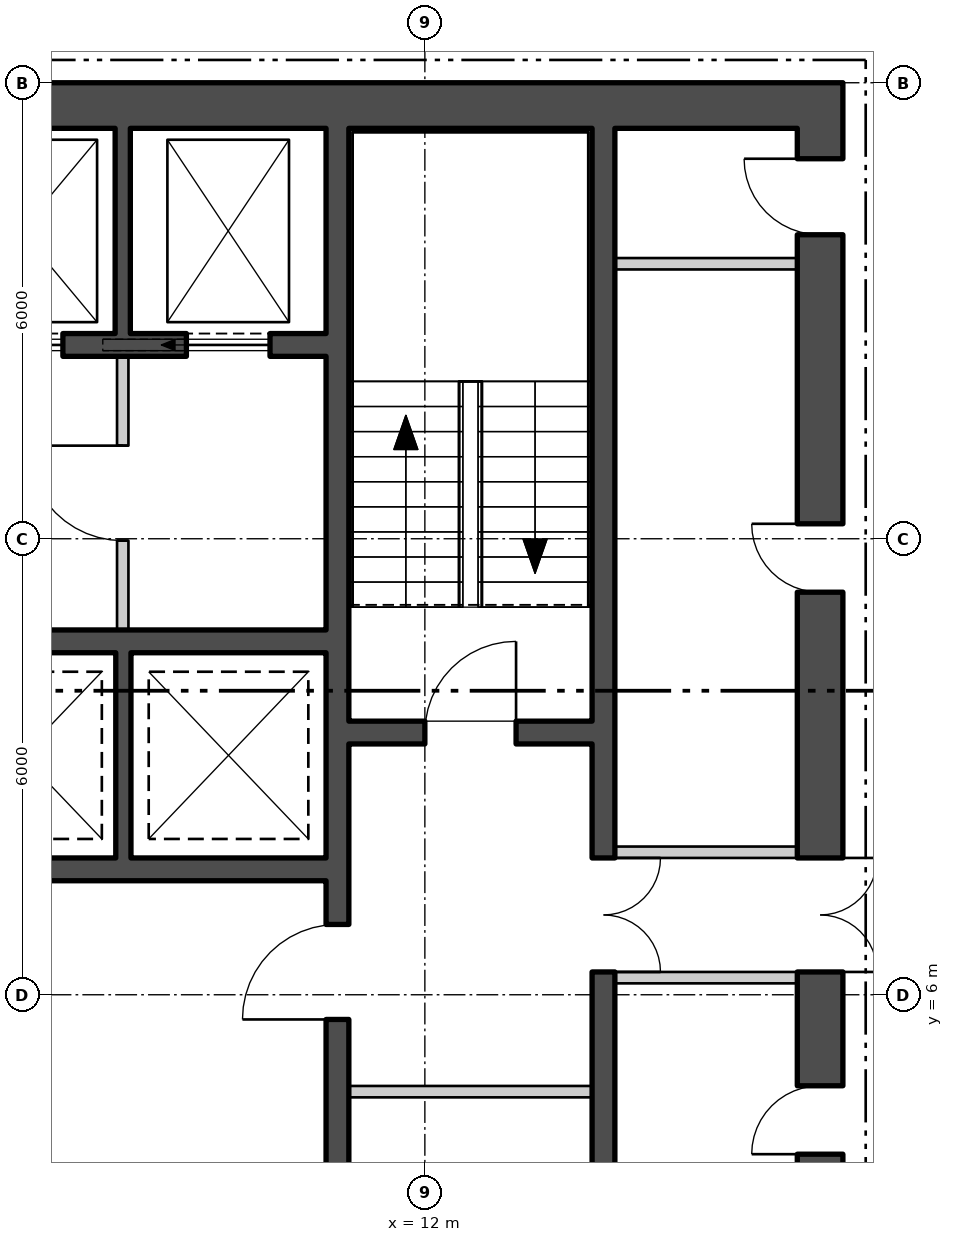
"""IFC4 building model, lengths in metres.
Left out: names, types, materials, properties, quantities, classifications, styles, units other than length and angle.
Written with IfcOpenShell. Run it as: python <this file> out.ifc"""

import sys

from ifc_helpers import new_model, si_unit, direction, frame, frame_2d, origin, place, context, subcontext, project, spatial, polyline, rectangle, outline, extrude, element, fill, save


model = new_model("IFC4")
c1 = context("Model", 3, precision=1e-05, world=origin(), true_north=direction((0.0, 1.0)))
c2 = subcontext(c1, "Body", "Model", "MODEL_VIEW")
j1 = project(units=[si_unit("LENGTHUNIT", "METRE"), si_unit("PLANEANGLEUNIT", "RADIAN")], contexts=[c1])
p1 = place(None, origin())
s1 = spatial("IfcSite", under=j1, at=p1, CompositionType="ELEMENT")
p2 = place(p1, origin())
s2 = spatial("IfcBuilding", under=s1, at=p2, CompositionType="ELEMENT")
p3 = place(p2, frame((0.0, 0.0, 78.3)))
s3 = spatial("IfcBuildingStorey", under=s2, at=p3, CompositionType="ELEMENT", Elevation=78.3)
p4 = place(p3, frame((5.22, -28.679, -0.18), z_axis=(0.0, 0.0, 1.0), x_axis=(0.500000711659, 0.866024992908, 0.0)))
e1 = element("IfcWall", 1, at=p4, inside=s3, PredefinedType="SOLIDWALL", context=c2, shape_type="SweptSolid", body=[
    extrude(outline(polyline([(-0.13, -0.225), (45.87, -0.225), (45.61, 0.225), (0.13, 0.225), (-0.13, -0.225)])), origin(), (0.0, 0.0, 1.0), 6.0),
])
p5 = place(p4, frame((1.424, 0.0, 1.38)))
e2 = element("IfcOpeningElement", 2, at=p5, cuts=e1, PredefinedType="OPENING", context=c2, shape_type="SweptSolid", body=[
    extrude(rectangle(XDim=2.4, YDim=3.6, at=frame_2d((1.2, 1.8))), frame((0.0, 0.235, 0.0), z_axis=(0.0, -1.0, 0.0), x_axis=(1.0, 0.0, 0.0)), (0.0, 0.0, 1.0), 0.47),
])
p6 = place(p4, frame((5.893, 0.0, 1.38)))
e3 = element("IfcOpeningElement", 3, at=p6, cuts=e1, PredefinedType="OPENING", context=c2, shape_type="SweptSolid", body=[
    extrude(rectangle(XDim=2.4, YDim=3.6, at=frame_2d((1.2, 1.8))), frame((0.0, 0.235, 0.0), z_axis=(0.0, -1.0, 0.0), x_axis=(1.0, 0.0, 0.0)), (0.0, 0.0, 1.0), 0.47),
])
p7 = place(p4, frame((10.401, 0.0, 1.38)))
e4 = element("IfcOpeningElement", 4, at=p7, cuts=e1, PredefinedType="OPENING", context=c2, shape_type="SweptSolid", body=[
    extrude(rectangle(XDim=2.4, YDim=3.6, at=frame_2d((1.2, 1.8))), frame((0.0, 0.235, 0.0), z_axis=(0.0, -1.0, 0.0), x_axis=(1.0, 0.0, 0.0)), (0.0, 0.0, 1.0), 0.47),
])
p8 = place(p4, frame((14.909, 0.0, 1.38)))
e5 = element("IfcOpeningElement", 5, at=p8, cuts=e1, PredefinedType="OPENING", context=c2, shape_type="SweptSolid", body=[
    extrude(rectangle(XDim=2.4, YDim=3.6, at=frame_2d((1.2, 1.8))), frame((0.0, 0.235, 0.0), z_axis=(0.0, -1.0, 0.0), x_axis=(1.0, 0.0, 0.0)), (0.0, 0.0, 1.0), 0.47),
])
p9 = place(p4, frame((19.416, 0.0, 1.38)))
e6 = element("IfcOpeningElement", 6, at=p9, cuts=e1, PredefinedType="OPENING", context=c2, shape_type="SweptSolid", body=[
    extrude(rectangle(XDim=2.4, YDim=3.6, at=frame_2d((1.2, 1.8))), frame((0.0, 0.235, 0.0), z_axis=(0.0, -1.0, 0.0), x_axis=(1.0, 0.0, 0.0)), (0.0, 0.0, 1.0), 0.47),
])
p10 = place(p4, frame((23.924, 0.0, 1.38)))
e7 = element("IfcOpeningElement", 7, at=p10, cuts=e1, PredefinedType="OPENING", context=c2, shape_type="SweptSolid", body=[
    extrude(rectangle(XDim=2.4, YDim=3.6, at=frame_2d((1.2, 1.8))), frame((0.0, 0.235, 0.0), z_axis=(0.0, -1.0, 0.0), x_axis=(1.0, 0.0, 0.0)), (0.0, 0.0, 1.0), 0.47),
])
p11 = place(p4, frame((28.431, 0.0, 1.38)))
e8 = element("IfcOpeningElement", 8, at=p11, cuts=e1, PredefinedType="OPENING", context=c2, shape_type="SweptSolid", body=[
    extrude(rectangle(XDim=2.4, YDim=3.6, at=frame_2d((1.2, 1.8))), frame((0.0, 0.235, 0.0), z_axis=(0.0, -1.0, 0.0), x_axis=(1.0, 0.0, 0.0)), (0.0, 0.0, 1.0), 0.47),
])
p12 = place(p4, frame((32.939, 0.0, 1.38)))
e9 = element("IfcOpeningElement", 9, at=p12, cuts=e1, PredefinedType="OPENING", context=c2, shape_type="SweptSolid", body=[
    extrude(rectangle(XDim=2.4, YDim=3.6, at=frame_2d((1.2, 1.8))), frame((0.0, 0.235, 0.0), z_axis=(0.0, -1.0, 0.0), x_axis=(1.0, 0.0, 0.0)), (0.0, 0.0, 1.0), 0.47),
])
p13 = place(p4, frame((37.447, 0.0, 1.38)))
e10 = element("IfcOpeningElement", 10, at=p13, cuts=e1, PredefinedType="OPENING", context=c2, shape_type="SweptSolid", body=[
    extrude(rectangle(XDim=2.4, YDim=3.6, at=frame_2d((1.2, 1.8))), frame((0.0, 0.235, 0.0), z_axis=(0.0, -1.0, 0.0), x_axis=(1.0, 0.0, 0.0)), (0.0, 0.0, 1.0), 0.47),
])
p14 = place(p4, frame((41.916, 0.0, 1.38)))
e11 = element("IfcOpeningElement", 11, at=p14, cuts=e1, PredefinedType="OPENING", context=c2, shape_type="SweptSolid", body=[
    extrude(rectangle(XDim=2.4, YDim=3.6, at=frame_2d((1.2, 1.8))), frame((0.0, 0.235, 0.0), z_axis=(0.0, -1.0, 0.0), x_axis=(1.0, 0.0, 0.0)), (0.0, 0.0, 1.0), 0.47),
])
p15 = place(p3, frame((-17.5, 17.7, 0.0), z_axis=(0.0, 0.0, 1.0), x_axis=(1.0, 0.0, 0.0)))
e12 = element("IfcWall", 12, at=p15, inside=s3, PredefinedType="SHEAR", context=c2, shape_type="SweptSolid", body=[
    extrude(rectangle(XDim=35.0, YDim=0.6, at=frame_2d((17.5, 0.0))), origin(), (0.0, 0.0, 1.0), 5.8),
])
p16 = place(p3, frame((17.2, 0.6, 0.0), z_axis=(0.0, 0.0, 1.0), x_axis=(0.0, 1.0, 0.0)))
e13 = element("IfcWall", 13, at=p16, inside=s3, PredefinedType="SHEAR", context=c2, shape_type="SweptSolid", body=[
    extrude(rectangle(XDim=16.8, YDim=0.6, at=frame_2d((8.4, 0.0))), origin(), (0.0, 0.0, 1.0), 5.8),
])
p17 = place(p16, frame((5.7, 0.0, 0.0)))
e14 = element("IfcOpeningElement", 14, at=p17, cuts=e13, PredefinedType="OPENING", context=c2, shape_type="SweptSolid", body=[
    extrude(rectangle(XDim=1.5, YDim=2.1, at=frame_2d((0.75, 1.05))), frame((0.0, 0.31, 0.0), z_axis=(0.0, -1.0, 0.0), x_axis=(1.0, 0.0, 0.0)), (0.0, 0.0, 1.0), 0.62),
])
p18 = place(p16, frame((0.452, 0.0, 0.0)))
e15 = element("IfcOpeningElement", 15, at=p18, cuts=e13, PredefinedType="OPENING", context=c2, shape_type="SweptSolid", body=[
    extrude(rectangle(XDim=0.9, YDim=2.1, at=frame_2d((0.45, 1.05))), frame((0.0, 0.31, 0.0), z_axis=(0.0, -1.0, 0.0), x_axis=(1.0, 0.0, 0.0)), (0.0, 0.0, 1.0), 0.62),
])
p19 = place(p16, frame((3.302, 0.0, 0.0)))
e16 = element("IfcOpeningElement", 16, at=p19, cuts=e13, PredefinedType="OPENING", context=c2, shape_type="SweptSolid", body=[
    extrude(rectangle(XDim=0.9, YDim=2.1, at=frame_2d((0.45, 1.05))), frame((0.0, 0.31, 0.0), z_axis=(0.0, -1.0, 0.0), x_axis=(1.0, 0.0, 0.0)), (0.0, 0.0, 1.0), 0.62),
])
p20 = place(p16, frame((10.697, 0.0, 0.0)))
e17 = element("IfcOpeningElement", 17, at=p20, cuts=e13, PredefinedType="OPENING", context=c2, shape_type="SweptSolid", body=[
    extrude(rectangle(XDim=0.9, YDim=2.1, at=frame_2d((0.45, 1.05))), frame((0.0, 0.31, 0.0), z_axis=(0.0, -1.0, 0.0), x_axis=(1.0, 0.0, 0.0)), (0.0, 0.0, 1.0), 0.62),
])
p21 = place(p16, frame((15.4, 0.0, 0.0)))
e18 = element("IfcOpeningElement", 18, at=p21, cuts=e13, PredefinedType="OPENING", context=c2, shape_type="SweptSolid", body=[
    extrude(rectangle(XDim=1.0, YDim=2.1, at=frame_2d((0.5, 1.05))), frame((0.0, 0.31, 0.0), z_axis=(0.0, -1.0, 0.0), x_axis=(1.0, 0.0, 0.0)), (0.0, 0.0, 1.0), 0.62),
])
p22 = place(p3, frame((10.85, 0.6, 0.0), z_axis=(0.0, 0.0, 1.0), x_axis=(0.0, 1.0, 0.0)))
e19 = element("IfcWall", 19, at=p22, inside=s3, PredefinedType="SHEAR", context=c2, shape_type="SweptSolid", body=[
    extrude(rectangle(XDim=16.8, YDim=0.3, at=frame_2d((8.4, 0.0))), origin(), (0.0, 0.0, 1.0), 5.8),
])
p23 = place(p22, frame((5.075, 0.0, 0.0)))
e20 = element("IfcOpeningElement", 20, at=p23, cuts=e19, PredefinedType="OPENING", context=c2, shape_type="SweptSolid", body=[
    extrude(rectangle(XDim=1.25, YDim=2.1, at=frame_2d((0.625, 1.05))), frame((0.0, 0.16, 0.0), z_axis=(0.0, -1.0, 0.0), x_axis=(1.0, 0.0, 0.0)), (0.0, 0.0, 1.0), 0.32),
])
p24 = place(p22, frame((1.525, 0.0, 0.0)))
e21 = element("IfcOpeningElement", 21, at=p24, cuts=e19, PredefinedType="OPENING", context=c2, shape_type="SweptSolid", body=[
    extrude(rectangle(XDim=1.0, YDim=2.1, at=frame_2d((0.5, 1.05))), frame((0.0, 0.16, 0.0), z_axis=(0.0, -1.0, 0.0), x_axis=(1.0, 0.0, 0.0)), (0.0, 0.0, 1.0), 0.32),
])
p25 = place(p3, frame((14.35, 0.6, 0.0), z_axis=(0.0, 0.0, 1.0), x_axis=(0.0, 1.0, 0.0)))
e22 = element("IfcWall", 22, at=p25, inside=s3, PredefinedType="SHEAR", context=c2, shape_type="SweptSolid", body=[
    extrude(rectangle(XDim=16.8, YDim=0.3, at=frame_2d((8.4, 0.0))), origin(), (0.0, 0.0, 1.0), 5.8),
])
p26 = place(p25, frame((5.7, 0.0, 0.0)))
e23 = element("IfcOpeningElement", 23, at=p26, cuts=e22, PredefinedType="OPENING", context=c2, shape_type="SweptSolid", body=[
    extrude(rectangle(XDim=1.5, YDim=2.1, at=frame_2d((0.75, 1.05))), frame((0.0, 0.16, 0.0), z_axis=(0.0, -1.0, 0.0), x_axis=(1.0, 0.0, 0.0)), (0.0, 0.0, 1.0), 0.32),
])
p27 = place(p3, frame((11.0, 9.45, 0.0), z_axis=(0.0, 0.0, 1.0), x_axis=(1.0, 0.0, 0.0)))
e24 = element("IfcWall", 24, at=p27, inside=s3, PredefinedType="SHEAR", context=c2, shape_type="SweptSolid", body=[
    extrude(rectangle(XDim=3.2, YDim=0.3, at=frame_2d((1.6, 0.0))), origin(), (0.0, 0.0, 1.0), 5.8),
])
p28 = place(p27, frame((1.0, 0.0, 0.0)))
e25 = element("IfcOpeningElement", 25, at=p28, cuts=e24, PredefinedType="OPENING", context=c2, shape_type="SweptSolid", body=[
    extrude(rectangle(XDim=1.2, YDim=2.1, at=frame_2d((0.6, 1.05))), frame((0.0, 0.16, 0.0), z_axis=(0.0, -1.0, 0.0), x_axis=(1.0, 0.0, 0.0)), (0.0, 0.0, 1.0), 0.32),
])
p29 = place(p3, frame((-10.7, 14.55, 0.0), z_axis=(0.0, 0.0, 1.0), x_axis=(1.0, 0.0, 0.0)))
e26 = element("IfcWall", 26, at=p29, inside=s3, PredefinedType="SHEAR", context=c2, shape_type="SweptSolid", body=[
    extrude(rectangle(XDim=21.4, YDim=0.3, at=frame_2d((10.7, 0.0))), origin(), (0.0, 0.0, 1.0), 5.8),
])
p30 = place(p29, frame((0.738, 0.0, 0.0)))
e27 = element("IfcOpeningElement", 27, at=p30, cuts=e26, PredefinedType="OPENING", context=c2, shape_type="SweptSolid", body=[
    extrude(rectangle(XDim=1.1, YDim=2.1, at=frame_2d((0.55, 1.05))), frame((0.0, 0.16, 0.0), z_axis=(0.0, -1.0, 0.0), x_axis=(1.0, 0.0, 0.0)), (0.0, 0.0, 1.0), 0.32),
])
p31 = place(p29, frame((3.462, 0.0, 0.0)))
e28 = element("IfcOpeningElement", 28, at=p31, cuts=e26, PredefinedType="OPENING", context=c2, shape_type="SweptSolid", body=[
    extrude(rectangle(XDim=1.1, YDim=2.1, at=frame_2d((0.55, 1.05))), frame((0.0, 0.16, 0.0), z_axis=(0.0, -1.0, 0.0), x_axis=(1.0, 0.0, 0.0)), (0.0, 0.0, 1.0), 0.32),
])
p32 = place(p29, frame((6.138, 0.0, 0.0)))
e29 = element("IfcOpeningElement", 29, at=p32, cuts=e26, PredefinedType="OPENING", context=c2, shape_type="SweptSolid", body=[
    extrude(rectangle(XDim=1.1, YDim=2.1, at=frame_2d((0.55, 1.05))), frame((0.0, 0.16, 0.0), z_axis=(0.0, -1.0, 0.0), x_axis=(1.0, 0.0, 0.0)), (0.0, 0.0, 1.0), 0.32),
])
p33 = place(p29, frame((8.812, 0.0, 0.0)))
e30 = element("IfcOpeningElement", 30, at=p33, cuts=e26, PredefinedType="OPENING", context=c2, shape_type="SweptSolid", body=[
    extrude(rectangle(XDim=1.1, YDim=2.1, at=frame_2d((0.55, 1.05))), frame((0.0, 0.16, 0.0), z_axis=(0.0, -1.0, 0.0), x_axis=(1.0, 0.0, 0.0)), (0.0, 0.0, 1.0), 0.32),
])
p34 = place(p29, frame((14.162, 0.0, 0.0)))
e31 = element("IfcOpeningElement", 31, at=p34, cuts=e26, PredefinedType="OPENING", context=c2, shape_type="SweptSolid", body=[
    extrude(rectangle(XDim=1.1, YDim=2.1, at=frame_2d((0.55, 1.05))), frame((0.0, 0.16, 0.0), z_axis=(0.0, -1.0, 0.0), x_axis=(1.0, 0.0, 0.0)), (0.0, 0.0, 1.0), 0.32),
])
p35 = place(p29, frame((16.837, 0.0, 0.0)))
e32 = element("IfcOpeningElement", 32, at=p35, cuts=e26, PredefinedType="OPENING", context=c2, shape_type="SweptSolid", body=[
    extrude(rectangle(XDim=1.1, YDim=2.1, at=frame_2d((0.55, 1.05))), frame((0.0, 0.16, 0.0), z_axis=(0.0, -1.0, 0.0), x_axis=(1.0, 0.0, 0.0)), (0.0, 0.0, 1.0), 0.32),
])
p36 = place(p29, frame((19.562, 0.0, 0.0)))
e33 = element("IfcOpeningElement", 33, at=p36, cuts=e26, PredefinedType="OPENING", context=c2, shape_type="SweptSolid", body=[
    extrude(rectangle(XDim=1.1, YDim=2.1, at=frame_2d((0.55, 1.05))), frame((0.0, 0.16, 0.0), z_axis=(0.0, -1.0, 0.0), x_axis=(1.0, 0.0, 0.0)), (0.0, 0.0, 1.0), 0.32),
])
for number, where, z_axis, x_axis in (
    (34, (2.6, 10.65, 0.0), (0.0, 0.0, 1.0), (1.0, 0.0, 0.0)),
    (35, (2.6, 7.65, 0.0), (0.0, 0.0, 1.0), (1.0, 0.0, 0.0)),
):
    element("IfcWall", number, at=place(p3, frame(where, z_axis=z_axis, x_axis=x_axis)), inside=s3, PredefinedType="SHEAR", context=c2, shape_type="SweptSolid", body=[
        extrude(rectangle(XDim=8.1, YDim=0.3, at=frame_2d((4.05, 0.0))), origin(), (0.0, 0.0, 1.0), 5.8),
    ])
for number, where, z_axis, x_axis in (
    (36, (8.025, 14.7, 0.0), (0.0, 0.0, 1.0), (0.0, 1.0, 0.0)),
    (37, (8.033, 7.8, 0.0), (0.0, 0.0, 1.0), (0.0, 1.0, 0.0)),
):
    element("IfcWall", number, at=place(p3, frame(where, z_axis=z_axis, x_axis=x_axis)), inside=s3, PredefinedType="SHEAR", context=c2, shape_type="SweptSolid", body=[
        extrude(rectangle(XDim=2.7, YDim=0.2, at=frame_2d((1.35, 0.0))), origin(), (0.0, 0.0, 1.0), 5.8),
    ])
p37 = place(p3, frame((8.025, 10.8, 0.0), z_axis=(0.0, 0.0, 1.0), x_axis=(0.0, 1.0, 0.0)))
e38 = element("IfcWall", 38, at=p37, inside=s3, PredefinedType="PARTITIONING", context=c2, shape_type="SweptSolid", body=[
    extrude(rectangle(XDim=3.6, YDim=0.15, at=frame_2d((1.8, 0.0))), origin(), (0.0, 0.0, 1.0), 5.8),
])
p38 = place(p37, frame((1.175, 0.0, 0.0)))
e39 = element("IfcOpeningElement", 39, at=p38, cuts=e38, PredefinedType="OPENING", context=c2, shape_type="SweptSolid", body=[
    extrude(rectangle(XDim=1.25, YDim=2.1, at=frame_2d((0.625, 1.05))), frame((0.0, 0.085, 0.0), z_axis=(0.0, -1.0, 0.0), x_axis=(1.0, 0.0, 0.0)), (0.0, 0.0, 1.0), 0.17),
])
p39 = place(p3, frame((11.0, 4.725, 0.0), z_axis=(0.0, 0.0, 1.0), x_axis=(1.0, 0.0, 0.0)))
e40 = element("IfcWall", 40, at=p39, inside=s3, PredefinedType="PARTITIONING", context=c2, shape_type="SweptSolid", body=[
    extrude(rectangle(XDim=3.2, YDim=0.15, at=frame_2d((1.6, 0.0))), origin(), (0.0, 0.0, 1.0), 5.8),
])
for number, where, z_axis, x_axis in (
    (41, (14.5, 6.225, 0.0), (0.0, 0.0, 1.0), (1.0, 0.0, 0.0)),
    (42, (14.5, 7.875, 0.0), (0.0, 0.0, 1.0), (1.0, 0.0, 0.0)),
    (43, (14.5, 15.618, 0.0), (0.0, 0.0, 1.0), (1.0, 0.0, 0.0)),
):
    element("IfcWall", number, at=place(p3, frame(where, z_axis=z_axis, x_axis=x_axis)), inside=s3, PredefinedType="PARTITIONING", context=c2, shape_type="SweptSolid", body=[
        extrude(rectangle(XDim=2.4, YDim=0.15, at=frame_2d((1.2, 0.0))), origin(), (0.0, 0.0, 1.0), 5.8),
    ])
p40 = place(p35, origin())
e44 = element("IfcDoor", 44, at=p40, inside=s3, OperationType="SLIDING_TO_LEFT", PredefinedType="DOOR", context=c2, shape_type="SweptSolid", body=[
    extrude(rectangle(XDim=1.1, YDim=2.1, at=frame_2d((0.55, 1.05))), frame((0.0, 0.025, 0.0), z_axis=(0.0, -1.0, 0.0), x_axis=(1.0, 0.0, 0.0)), (0.0, 0.0, 1.0), 0.05),
])
fill(e32, e44)
p41 = place(p36, origin())
e45 = element("IfcDoor", 45, at=p41, inside=s3, OperationType="SLIDING_TO_LEFT", PredefinedType="DOOR", context=c2, shape_type="SweptSolid", body=[
    extrude(rectangle(XDim=1.1, YDim=2.1, at=frame_2d((0.55, 1.05))), frame((0.0, 0.025, 0.0), z_axis=(0.0, -1.0, 0.0), x_axis=(1.0, 0.0, 0.0)), (0.0, 0.0, 1.0), 0.05),
])
fill(e33, e45)
p42 = place(p38, origin())
e46 = element("IfcDoor", 46, at=p42, inside=s3, OperationType="SINGLE_SWING_LEFT", PredefinedType="DOOR", context=c2, shape_type="SweptSolid", body=[
    extrude(rectangle(XDim=1.25, YDim=2.1, at=frame_2d((0.625, 1.05))), frame((0.0, 0.025, 0.0), z_axis=(0.0, -1.0, 0.0), x_axis=(1.0, 0.0, 0.0)), (0.0, 0.0, 1.0), 0.05),
])
fill(e39, e46)
p43 = place(p28, origin())
e47 = element("IfcDoor", 47, at=p43, inside=s3, OperationType="SINGLE_SWING_LEFT", PredefinedType="DOOR", context=c2, shape_type="SweptSolid", body=[
    extrude(rectangle(XDim=1.2, YDim=2.1, at=frame_2d((0.6, 1.05))), frame((0.0, 0.025, 0.0), z_axis=(0.0, -1.0, 0.0), x_axis=(1.0, 0.0, 0.0)), (0.0, 0.0, 1.0), 0.05),
])
fill(e25, e47)
p44 = place(p23, origin())
e48 = element("IfcDoor", 48, at=p44, inside=s3, OperationType="SINGLE_SWING_RIGHT", PredefinedType="DOOR", context=c2, shape_type="SweptSolid", body=[
    extrude(rectangle(XDim=1.25, YDim=2.1, at=frame_2d((0.625, 1.05))), frame((0.0, 0.025, 0.0), z_axis=(0.0, -1.0, 0.0), x_axis=(1.0, 0.0, 0.0)), (0.0, 0.0, 1.0), 0.05),
])
fill(e20, e48)
p45 = place(p26, origin())
e49 = element("IfcDoor", 49, at=p45, inside=s3, OperationType="DOUBLE_DOOR_SINGLE_SWING", PredefinedType="DOOR", context=c2, shape_type="SweptSolid", body=[
    extrude(rectangle(XDim=1.5, YDim=2.1, at=frame_2d((0.75, 1.05))), frame((0.0, 0.025, 0.0), z_axis=(0.0, -1.0, 0.0), x_axis=(1.0, 0.0, 0.0)), (0.0, 0.0, 1.0), 0.05),
])
fill(e23, e49)
p46 = place(p17, origin())
e50 = element("IfcDoor", 50, at=p46, inside=s3, OperationType="DOUBLE_DOOR_SINGLE_SWING", PredefinedType="DOOR", context=c2, shape_type="SweptSolid", body=[
    extrude(rectangle(XDim=1.5, YDim=2.1, at=frame_2d((0.75, 1.05))), frame((0.0, 0.025, 0.0), z_axis=(0.0, -1.0, 0.0), x_axis=(1.0, 0.0, 0.0)), (0.0, 0.0, 1.0), 0.05),
])
fill(e14, e50)
p47 = place(p19, origin())
e51 = element("IfcDoor", 51, at=p47, inside=s3, OperationType="SINGLE_SWING_RIGHT", PredefinedType="DOOR", context=c2, shape_type="SweptSolid", body=[
    extrude(rectangle(XDim=0.9, YDim=2.1, at=frame_2d((0.45, 1.05))), frame((0.0, 0.025, 0.0), z_axis=(0.0, -1.0, 0.0), x_axis=(1.0, 0.0, 0.0)), (0.0, 0.0, 1.0), 0.05),
])
fill(e16, e51)
p48 = place(p20, origin())
e52 = element("IfcDoor", 52, at=p48, inside=s3, OperationType="SINGLE_SWING_LEFT", PredefinedType="DOOR", context=c2, shape_type="SweptSolid", body=[
    extrude(rectangle(XDim=0.9, YDim=2.1, at=frame_2d((0.45, 1.05))), frame((0.0, 0.025, 0.0), z_axis=(0.0, -1.0, 0.0), x_axis=(1.0, 0.0, 0.0)), (0.0, 0.0, 1.0), 0.05),
])
fill(e17, e52)
p49 = place(p21, origin())
e53 = element("IfcDoor", 53, at=p49, inside=s3, OperationType="SINGLE_SWING_LEFT", PredefinedType="DOOR", context=c2, shape_type="SweptSolid", body=[
    extrude(rectangle(XDim=1.0, YDim=2.1, at=frame_2d((0.5, 1.05))), frame((0.0, 0.025, 0.0), z_axis=(0.0, -1.0, 0.0), x_axis=(1.0, 0.0, 0.0)), (0.0, 0.0, 1.0), 0.05),
])
fill(e18, e53)
save(model, sys.argv[1])
